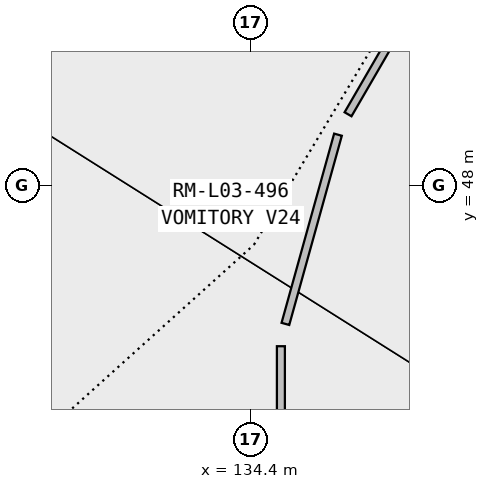
"""IFC4 building model, lengths in metres.
Left out: names, types, materials, properties, quantities, classifications, styles, units other than length and angle.
Written with IfcOpenShell. Run it as: python <this file> out.ifc"""

import sys

from ifc_helpers import new_model, si_unit, direction, frame, frame_2d, origin, place, context, subcontext, project, spatial, rectangle, extrude, element, save


model = new_model("IFC4")
c1 = context("Model", 3, precision=1e-05, world=origin(), true_north=direction((0.0, 1.0)))
c2 = subcontext(c1, "Body", "Model", "MODEL_VIEW")
j1 = project(units=[si_unit("LENGTHUNIT", "METRE"), si_unit("PLANEANGLEUNIT", "RADIAN")], contexts=[c1])
p1 = place(None, origin())
s1 = spatial("IfcSite", under=j1, at=p1, CompositionType="ELEMENT")
p2 = place(p1, origin())
s2 = spatial("IfcBuilding", under=s1, at=p2, CompositionType="ELEMENT")
p3 = place(p2, frame((0.0, 0.0, 14.4)))
s3 = spatial("IfcBuildingStorey", under=s2, at=p3, CompositionType="ELEMENT", Elevation=14.4)
p4 = place(p3, frame((134.8, 44.22, 0.0), z_axis=(0.0, 0.0, 1.0), x_axis=(0.0, 1.0, 0.0)))
e1 = element("IfcWall", 1, at=p4, inside=s3, PredefinedType="PARTITIONING", context=c2, shape_type="SweptSolid", body=[
    extrude(rectangle(XDim=1.67, YDim=0.105, at=frame_2d((0.835, 0.0))), origin(), (0.0, 0.0, 1.0), 4.2),
])
p5 = place(p3, frame((134.859, 46.184, 0.0), z_axis=(0.0, 0.0, 1.0), x_axis=(0.26771209644, 0.963498953513, 0.0)))
e2 = element("IfcWall", 2, at=p5, inside=s3, PredefinedType="PARTITIONING", context=c2, shape_type="SweptSolid", body=[
    extrude(rectangle(XDim=2.583, YDim=0.105, at=frame_2d((1.292, 0.0))), origin(), (0.0, 0.0, 1.0), 4.2),
])
p6 = place(p3, frame((135.684, 48.941, 0.0), z_axis=(0.0, 0.0, 1.0), x_axis=(0.501857543881, 0.864950290855, 0.0)))
e3 = element("IfcWall", 3, at=p6, inside=s3, PredefinedType="PARTITIONING", context=c2, shape_type="SweptSolid", body=[
    extrude(rectangle(XDim=7.205, YDim=0.105, at=frame_2d((3.602, 0.0))), origin(), (0.0, 0.0, 1.0), 4.2),
])
save(model, sys.argv[1])
